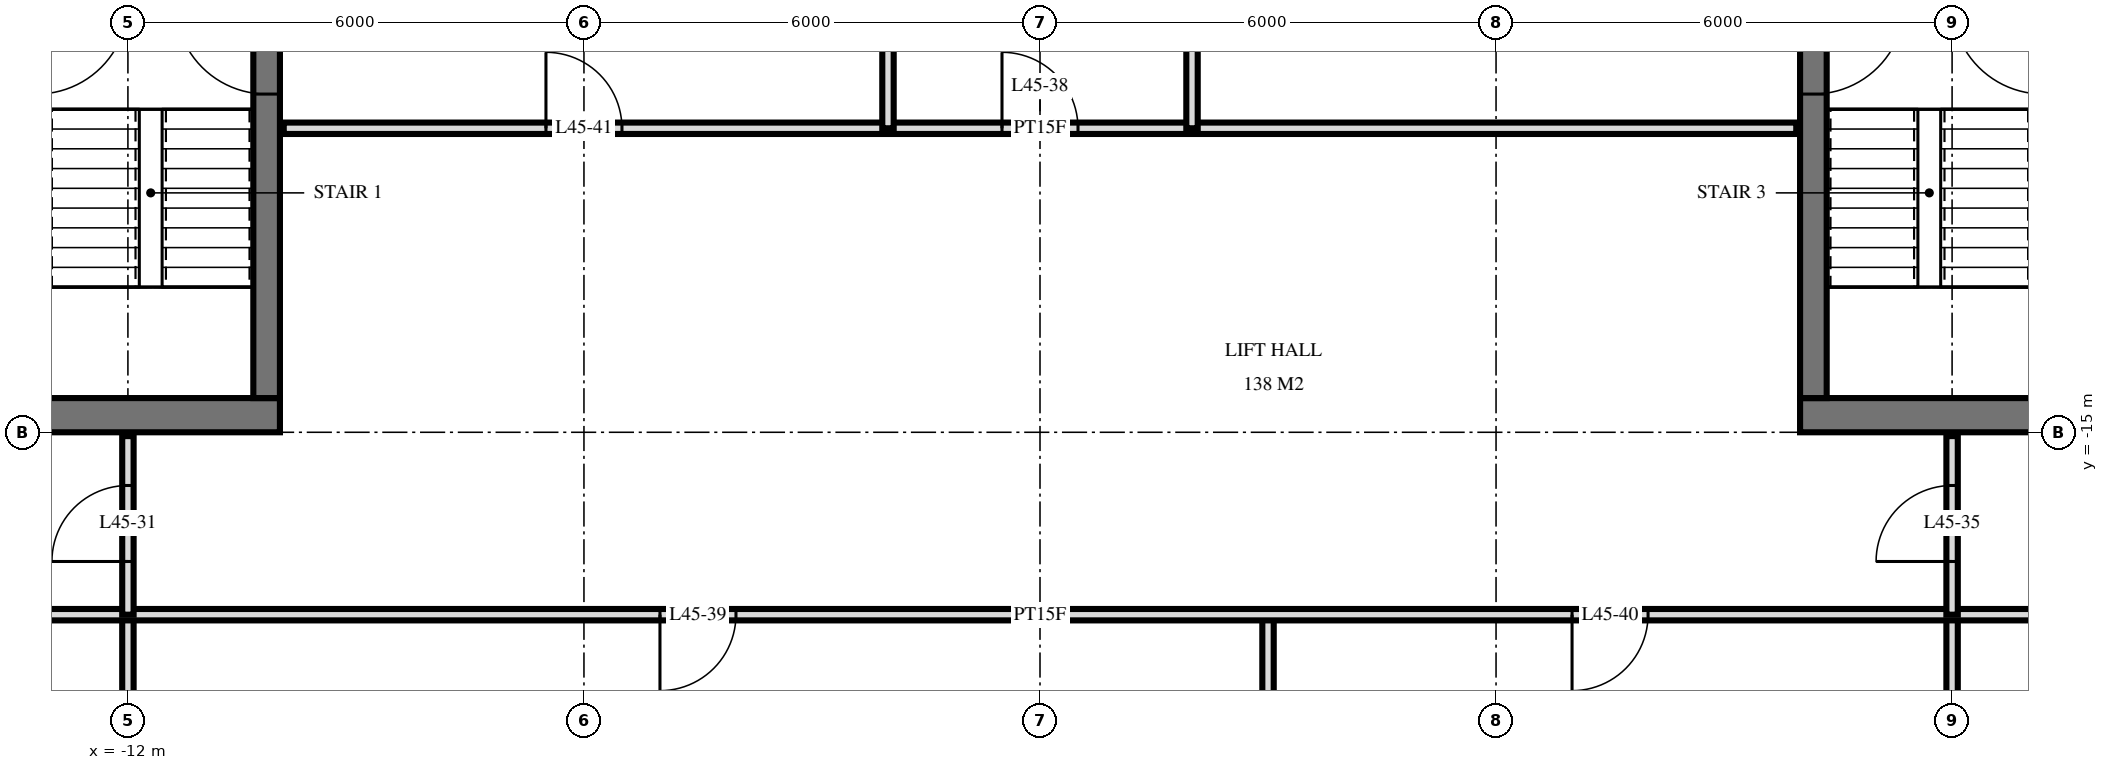
"""IFC4 building model, lengths in metres.
Left out: names, types, materials, properties, quantities, classifications, styles, units other than length and angle.
Written with IfcOpenShell. Run it as: python <this file> out.ifc"""

import sys

from ifc_helpers import new_model, si_unit, direction, frame, frame_2d, origin, place, context, subcontext, project, spatial, rectangle, extrude, element, fill, save


model = new_model("IFC4")
c1 = context("Model", 3, precision=1e-05, world=origin(), true_north=direction((0.0, 1.0)))
c2 = subcontext(c1, "Body", "Model", "MODEL_VIEW")
j1 = project(units=[si_unit("LENGTHUNIT", "METRE"), si_unit("PLANEANGLEUNIT", "RADIAN")], contexts=[c1])
p1 = place(None, origin())
s1 = spatial("IfcSite", under=j1, at=p1, CompositionType="ELEMENT")
p2 = place(p1, origin())
s2 = spatial("IfcBuilding", under=s1, at=p2, CompositionType="ELEMENT")
p3 = place(p2, frame((0.0, 0.0, 174.0)))
s3 = spatial("IfcBuildingStorey", under=s2, at=p3, CompositionType="ELEMENT", Elevation=174.0)
p4 = place(p3, frame((-24.5, -14.775, 0.0), z_axis=(0.0, 0.0, 1.0), x_axis=(1.0, 0.0, 0.0)))
e1 = element("IfcWall", 1, at=p4, inside=s3, PredefinedType="SHEAR", context=c2, shape_type="SweptSolid", body=[
    extrude(rectangle(XDim=14.5, YDim=0.45, at=frame_2d((7.25, 0.0))), origin(), (0.0, 0.0, 1.0), 3.6),
])
p5 = place(p4, frame((6.2, 0.0, 0.0)))
e2 = element("IfcOpeningElement", 2, at=p5, cuts=e1, PredefinedType="OPENING", context=c2, shape_type="SweptSolid", body=[
    extrude(rectangle(XDim=1.2, YDim=2.1, at=frame_2d((0.6, 1.05))), frame((0.0, 0.235, 0.0), z_axis=(0.0, -1.0, 0.0), x_axis=(1.0, 0.0, 0.0)), (0.0, 0.0, 1.0), 0.47),
])
p6 = place(p4, frame((9.25, 0.0, 0.0)))
e3 = element("IfcOpeningElement", 3, at=p6, cuts=e1, PredefinedType="OPENING", context=c2, shape_type="SweptSolid", body=[
    extrude(rectangle(XDim=1.1, YDim=2.1, at=frame_2d((0.55, 1.05))), frame((0.0, 0.235, 0.0), z_axis=(0.0, -1.0, 0.0), x_axis=(1.0, 0.0, 0.0)), (0.0, 0.0, 1.0), 0.47),
])
p7 = place(p4, frame((3.5, 0.0, 0.0)))
e4 = element("IfcOpeningElement", 4, at=p7, cuts=e1, PredefinedType="OPENING", context=c2, shape_type="SweptSolid", body=[
    extrude(rectangle(XDim=0.9, YDim=2.1, at=frame_2d((0.45, 1.05))), frame((0.0, 0.235, 0.0), z_axis=(0.0, -1.0, 0.0), x_axis=(1.0, 0.0, 0.0)), (0.0, 0.0, 1.0), 0.47),
])
p8 = place(p4, frame((1.05, 0.0, 0.0)))
e5 = element("IfcOpeningElement", 5, at=p8, cuts=e1, PredefinedType="OPENING", context=c2, shape_type="SweptSolid", body=[
    extrude(rectangle(XDim=1.0, YDim=2.1, at=frame_2d((0.5, 1.05))), frame((0.0, 0.235, 0.0), z_axis=(0.0, -1.0, 0.0), x_axis=(1.0, 0.0, 0.0)), (0.0, 0.0, 1.0), 0.47),
])
p9 = place(p3, frame((-10.175, -14.55, 0.0), z_axis=(0.0, 0.0, 1.0), x_axis=(0.0, 1.0, 0.0)))
e6 = element("IfcWall", 6, at=p9, inside=s3, PredefinedType="SHEAR", context=c2, shape_type="SweptSolid", body=[
    extrude(rectangle(XDim=14.1, YDim=0.35, at=frame_2d((7.05, 0.0))), origin(), (0.0, 0.0, 1.0), 3.6),
])
p10 = place(p9, frame((8.4, 0.0, 0.0)))
e7 = element("IfcOpeningElement", 7, at=p10, cuts=e6, PredefinedType="OPENING", context=c2, shape_type="SweptSolid", body=[
    extrude(rectangle(XDim=1.4, YDim=2.4, at=frame_2d((0.7, 1.2))), frame((0.0, 0.185, 0.0), z_axis=(0.0, -1.0, 0.0), x_axis=(1.0, 0.0, 0.0)), (0.0, 0.0, 1.0), 0.37),
])
p11 = place(p9, frame((10.0, 0.0, 0.0)))
e8 = element("IfcOpeningElement", 8, at=p11, cuts=e6, PredefinedType="OPENING", context=c2, shape_type="SweptSolid", body=[
    extrude(rectangle(XDim=1.4, YDim=2.4, at=frame_2d((0.7, 1.2))), frame((0.0, 0.185, 0.0), z_axis=(0.0, -1.0, 0.0), x_axis=(1.0, 0.0, 0.0)), (0.0, 0.0, 1.0), 0.37),
])
p12 = place(p9, frame((4.0, 0.0, 0.0)))
e9 = element("IfcOpeningElement", 9, at=p12, cuts=e6, PredefinedType="OPENING", context=c2, shape_type="SweptSolid", body=[
    extrude(rectangle(XDim=1.2, YDim=2.1, at=frame_2d((0.6, 1.05))), frame((0.0, 0.185, 0.0), z_axis=(0.0, -1.0, 0.0), x_axis=(1.0, 0.0, 0.0)), (0.0, 0.0, 1.0), 0.37),
])
p13 = place(p3, frame((10.0, -14.775, 0.0), z_axis=(0.0, 0.0, 1.0), x_axis=(1.0, 0.0, 0.0)))
e10 = element("IfcWall", 10, at=p13, inside=s3, PredefinedType="SHEAR", context=c2, shape_type="SweptSolid", body=[
    extrude(rectangle(XDim=14.5, YDim=0.45, at=frame_2d((7.25, 0.0))), origin(), (0.0, 0.0, 1.0), 3.6),
])
p14 = place(p13, frame((7.1, 0.0, 0.0)))
e11 = element("IfcOpeningElement", 11, at=p14, cuts=e10, PredefinedType="OPENING", context=c2, shape_type="SweptSolid", body=[
    extrude(rectangle(XDim=1.2, YDim=2.1, at=frame_2d((0.6, 1.05))), frame((0.0, 0.235, 0.0), z_axis=(0.0, -1.0, 0.0), x_axis=(1.0, 0.0, 0.0)), (0.0, 0.0, 1.0), 0.47),
])
p15 = place(p13, frame((4.15, 0.0, 0.0)))
e12 = element("IfcOpeningElement", 12, at=p15, cuts=e10, PredefinedType="OPENING", context=c2, shape_type="SweptSolid", body=[
    extrude(rectangle(XDim=1.1, YDim=2.1, at=frame_2d((0.55, 1.05))), frame((0.0, 0.235, 0.0), z_axis=(0.0, -1.0, 0.0), x_axis=(1.0, 0.0, 0.0)), (0.0, 0.0, 1.0), 0.47),
])
p16 = place(p13, frame((10.1, 0.0, 0.0)))
e13 = element("IfcOpeningElement", 13, at=p16, cuts=e10, PredefinedType="OPENING", context=c2, shape_type="SweptSolid", body=[
    extrude(rectangle(XDim=0.9, YDim=2.1, at=frame_2d((0.45, 1.05))), frame((0.0, 0.235, 0.0), z_axis=(0.0, -1.0, 0.0), x_axis=(1.0, 0.0, 0.0)), (0.0, 0.0, 1.0), 0.47),
])
p17 = place(p13, frame((12.45, 0.0, 0.0)))
e14 = element("IfcOpeningElement", 14, at=p17, cuts=e10, PredefinedType="OPENING", context=c2, shape_type="SweptSolid", body=[
    extrude(rectangle(XDim=1.0, YDim=2.1, at=frame_2d((0.5, 1.05))), frame((0.0, 0.235, 0.0), z_axis=(0.0, -1.0, 0.0), x_axis=(1.0, 0.0, 0.0)), (0.0, 0.0, 1.0), 0.47),
])
p18 = place(p3, frame((10.175, -14.55, 0.0), z_axis=(0.0, 0.0, 1.0), x_axis=(0.0, 1.0, 0.0)))
e15 = element("IfcWall", 15, at=p18, inside=s3, PredefinedType="SHEAR", context=c2, shape_type="SweptSolid", body=[
    extrude(rectangle(XDim=14.1, YDim=0.35, at=frame_2d((7.05, 0.0))), origin(), (0.0, 0.0, 1.0), 3.6),
])
p19 = place(p18, frame((8.4, 0.0, 0.0)))
e16 = element("IfcOpeningElement", 16, at=p19, cuts=e15, PredefinedType="OPENING", context=c2, shape_type="SweptSolid", body=[
    extrude(rectangle(XDim=1.4, YDim=2.4, at=frame_2d((0.7, 1.2))), frame((0.0, 0.185, 0.0), z_axis=(0.0, -1.0, 0.0), x_axis=(1.0, 0.0, 0.0)), (0.0, 0.0, 1.0), 0.37),
])
p20 = place(p18, frame((10.0, 0.0, 0.0)))
e17 = element("IfcOpeningElement", 17, at=p20, cuts=e15, PredefinedType="OPENING", context=c2, shape_type="SweptSolid", body=[
    extrude(rectangle(XDim=1.4, YDim=2.4, at=frame_2d((0.7, 1.2))), frame((0.0, 0.185, 0.0), z_axis=(0.0, -1.0, 0.0), x_axis=(1.0, 0.0, 0.0)), (0.0, 0.0, 1.0), 0.37),
])
p21 = place(p18, frame((4.0, 0.0, 0.0)))
e18 = element("IfcOpeningElement", 18, at=p21, cuts=e15, PredefinedType="OPENING", context=c2, shape_type="SweptSolid", body=[
    extrude(rectangle(XDim=1.2, YDim=2.1, at=frame_2d((0.6, 1.05))), frame((0.0, 0.185, 0.0), z_axis=(0.0, -1.0, 0.0), x_axis=(1.0, 0.0, 0.0)), (0.0, 0.0, 1.0), 0.37),
])
p22 = place(p3, frame((12.0, -17.4, 0.0), z_axis=(0.0, 0.0, 1.0), x_axis=(0.0, 1.0, 0.0)))
e19 = element("IfcWall", 19, at=p22, inside=s3, PredefinedType="PARTITIONING", context=c2, shape_type="SweptSolid", body=[
    extrude(rectangle(XDim=2.35, YDim=0.15, at=frame_2d((1.175, 0.0))), origin(), (0.0, 0.0, 1.0), 3.32),
])
p23 = place(p22, frame((0.7, 0.0, 0.0)))
e20 = element("IfcOpeningElement", 20, at=p23, cuts=e19, PredefinedType="OPENING", context=c2, shape_type="SweptSolid", body=[
    extrude(rectangle(XDim=1.0, YDim=2.1, at=frame_2d((0.5, 1.05))), frame((0.0, 0.085, 0.0), z_axis=(0.0, -1.0, 0.0), x_axis=(1.0, 0.0, 0.0)), (0.0, 0.0, 1.0), 0.17),
])
for number, where, z_axis, x_axis in (
    (21, (12.0, -33.62, 0.0), (0.0, 0.0, 1.0), (0.0, 1.0, 0.0)),
    (22, (3.0, -33.62, 0.0), (0.0, 0.0, 1.0), (0.0, 1.0, 0.0)),
):
    element("IfcWall", number, at=place(p3, frame(where, z_axis=z_axis, x_axis=x_axis)), inside=s3, PredefinedType="PARTITIONING", context=c2, shape_type="SweptSolid", body=[
        extrude(rectangle(XDim=16.22, YDim=0.15, at=frame_2d((8.11, 0.0))), origin(), (0.0, 0.0, 1.0), 3.32),
    ])
for number, where, z_axis, x_axis in (
    (23, (2.0, -11.0, 0.0), (0.0, 0.0, 1.0), (0.0, 1.0, 0.0)),
    (24, (-2.0, -11.0, 0.0), (0.0, 0.0, 1.0), (0.0, 1.0, 0.0)),
):
    element("IfcWall", number, at=place(p3, frame(where, z_axis=z_axis, x_axis=x_axis)), inside=s3, PredefinedType="PARTITIONING", context=c2, shape_type="SweptSolid", body=[
        extrude(rectangle(XDim=4.0, YDim=0.15, at=frame_2d((2.0, 0.0))), origin(), (0.0, 0.0, 1.0), 3.32),
    ])
p24 = place(p3, frame((-12.0, -17.4, 0.0), z_axis=(0.0, 0.0, 1.0), x_axis=(0.0, 1.0, 0.0)))
e25 = element("IfcWall", 25, at=p24, inside=s3, PredefinedType="PARTITIONING", context=c2, shape_type="SweptSolid", body=[
    extrude(rectangle(XDim=2.35, YDim=0.15, at=frame_2d((1.175, 0.0))), origin(), (0.0, 0.0, 1.0), 3.32),
])
p25 = place(p24, frame((0.7, 0.0, 0.0)))
e26 = element("IfcOpeningElement", 26, at=p25, cuts=e25, PredefinedType="OPENING", context=c2, shape_type="SweptSolid", body=[
    extrude(rectangle(XDim=1.0, YDim=2.1, at=frame_2d((0.5, 1.05))), frame((0.0, 0.085, 0.0), z_axis=(0.0, -1.0, 0.0), x_axis=(1.0, 0.0, 0.0)), (0.0, 0.0, 1.0), 0.17),
])
p26 = place(p3, frame((-12.0, -33.62, 0.0), z_axis=(0.0, 0.0, 1.0), x_axis=(0.0, 1.0, 0.0)))
e27 = element("IfcWall", 27, at=p26, inside=s3, PredefinedType="PARTITIONING", context=c2, shape_type="SweptSolid", body=[
    extrude(rectangle(XDim=16.22, YDim=0.15, at=frame_2d((8.11, 0.0))), origin(), (0.0, 0.0, 1.0), 3.32),
])
p27 = place(p3, frame((-28.02, -17.4, 0.0), z_axis=(0.0, 0.0, 1.0), x_axis=(1.0, 0.0, 0.0)))
e28 = element("IfcWall", 28, at=p27, inside=s3, PredefinedType="PARTITIONING", context=c2, shape_type="SweptSolid", body=[
    extrude(rectangle(XDim=56.04, YDim=0.15, at=frame_2d((28.02, 0.0))), origin(), (0.0, 0.0, 1.0), 3.32),
])
p28 = place(p27, frame((10.42, 0.0, 0.0)))
e29 = element("IfcOpeningElement", 29, at=p28, cuts=e28, PredefinedType="OPENING", context=c2, shape_type="SweptSolid", body=[
    extrude(rectangle(XDim=1.0, YDim=2.1, at=frame_2d((0.5, 1.05))), frame((0.0, 0.085, 0.0), z_axis=(0.0, -1.0, 0.0), x_axis=(1.0, 0.0, 0.0)), (0.0, 0.0, 1.0), 0.17),
])
p29 = place(p27, frame((2.32, 0.0, 0.0)))
e30 = element("IfcOpeningElement", 30, at=p29, cuts=e28, PredefinedType="OPENING", context=c2, shape_type="SweptSolid", body=[
    extrude(rectangle(XDim=1.0, YDim=2.1, at=frame_2d((0.5, 1.05))), frame((0.0, 0.085, 0.0), z_axis=(0.0, -1.0, 0.0), x_axis=(1.0, 0.0, 0.0)), (0.0, 0.0, 1.0), 0.17),
])
p30 = place(p27, frame((49.72, 0.0, 0.0)))
e31 = element("IfcOpeningElement", 31, at=p30, cuts=e28, PredefinedType="OPENING", context=c2, shape_type="SweptSolid", body=[
    extrude(rectangle(XDim=1.0, YDim=2.1, at=frame_2d((0.5, 1.05))), frame((0.0, 0.085, 0.0), z_axis=(0.0, -1.0, 0.0), x_axis=(1.0, 0.0, 0.0)), (0.0, 0.0, 1.0), 0.17),
])
p31 = place(p27, frame((23.02, 0.0, 0.0)))
e32 = element("IfcOpeningElement", 32, at=p31, cuts=e28, PredefinedType="OPENING", context=c2, shape_type="SweptSolid", body=[
    extrude(rectangle(XDim=1.0, YDim=2.1, at=frame_2d((0.5, 1.05))), frame((0.0, 0.085, 0.0), z_axis=(0.0, -1.0, 0.0), x_axis=(1.0, 0.0, 0.0)), (0.0, 0.0, 1.0), 0.17),
])
p32 = place(p27, frame((35.02, 0.0, 0.0)))
e33 = element("IfcOpeningElement", 33, at=p32, cuts=e28, PredefinedType="OPENING", context=c2, shape_type="SweptSolid", body=[
    extrude(rectangle(XDim=1.0, YDim=2.1, at=frame_2d((0.5, 1.05))), frame((0.0, 0.085, 0.0), z_axis=(0.0, -1.0, 0.0), x_axis=(1.0, 0.0, 0.0)), (0.0, 0.0, 1.0), 0.17),
])
p33 = place(p3, frame((-9.95, -11.0, 0.0), z_axis=(0.0, 0.0, 1.0), x_axis=(1.0, 0.0, 0.0)))
e34 = element("IfcWall", 34, at=p33, inside=s3, PredefinedType="PARTITIONING", context=c2, shape_type="SweptSolid", body=[
    extrude(rectangle(XDim=19.9, YDim=0.15, at=frame_2d((9.95, 0.0))), origin(), (0.0, 0.0, 1.0), 3.32),
])
p34 = place(p33, frame((9.45, 0.0, 0.0)))
e35 = element("IfcOpeningElement", 35, at=p34, cuts=e34, PredefinedType="OPENING", context=c2, shape_type="SweptSolid", body=[
    extrude(rectangle(XDim=1.0, YDim=2.1, at=frame_2d((0.5, 1.05))), frame((0.0, 0.085, 0.0), z_axis=(0.0, -1.0, 0.0), x_axis=(1.0, 0.0, 0.0)), (0.0, 0.0, 1.0), 0.17),
])
p35 = place(p33, frame((3.45, 0.0, 0.0)))
e36 = element("IfcOpeningElement", 36, at=p35, cuts=e34, PredefinedType="OPENING", context=c2, shape_type="SweptSolid", body=[
    extrude(rectangle(XDim=1.0, YDim=2.1, at=frame_2d((0.5, 1.05))), frame((0.0, 0.085, 0.0), z_axis=(0.0, -1.0, 0.0), x_axis=(1.0, 0.0, 0.0)), (0.0, 0.0, 1.0), 0.17),
])
p36 = place(p12, origin())
e37 = element("IfcDoor", 37, at=p36, inside=s3, OperationType="SINGLE_SWING_LEFT", PredefinedType="DOOR", context=c2, shape_type="SweptSolid", body=[
    extrude(rectangle(XDim=1.2, YDim=2.1, at=frame_2d((0.6, 1.05))), frame((0.0, 0.025, 0.0), z_axis=(0.0, -1.0, 0.0), x_axis=(1.0, 0.0, 0.0)), (0.0, 0.0, 1.0), 0.05),
])
fill(e9, e37)
p37 = place(p21, frame((0.6, 0.0, 0.0), z_axis=(0.0, 0.0, 1.0), x_axis=(-1.0, 0.0, 0.0)))
e38 = element("IfcDoor", 38, at=p37, inside=s3, OperationType="SINGLE_SWING_RIGHT", PredefinedType="DOOR", context=c2, shape_type="SweptSolid", body=[
    extrude(rectangle(XDim=1.2, YDim=2.1, at=frame_2d((0.0, 1.05))), frame((0.0, -0.025, 0.0), z_axis=(0.0, 1.0, 0.0), x_axis=(-1.0, 0.0, 0.0)), (0.0, 0.0, 1.0), 0.05),
])
fill(e18, e38)
p38 = place(p25, origin())
e39 = element("IfcDoor", 39, at=p38, inside=s3, OperationType="SINGLE_SWING_RIGHT", PredefinedType="DOOR", context=c2, shape_type="SweptSolid", body=[
    extrude(rectangle(XDim=1.0, YDim=2.1, at=frame_2d((0.5, 1.05))), frame((0.0, 0.025, 0.0), z_axis=(0.0, -1.0, 0.0), x_axis=(1.0, 0.0, 0.0)), (0.0, 0.0, 1.0), 0.05),
])
fill(e26, e39)
p39 = place(p23, origin())
e40 = element("IfcDoor", 40, at=p39, inside=s3, OperationType="SINGLE_SWING_RIGHT", PredefinedType="DOOR", context=c2, shape_type="SweptSolid", body=[
    extrude(rectangle(XDim=1.0, YDim=2.1, at=frame_2d((0.5, 1.05))), frame((0.0, 0.025, 0.0), z_axis=(0.0, -1.0, 0.0), x_axis=(1.0, 0.0, 0.0)), (0.0, 0.0, 1.0), 0.05),
])
fill(e20, e40)
p40 = place(p34, origin())
e41 = element("IfcDoor", 41, at=p40, inside=s3, OperationType="SINGLE_SWING_RIGHT", PredefinedType="DOOR", context=c2, shape_type="SweptSolid", body=[
    extrude(rectangle(XDim=1.0, YDim=2.1, at=frame_2d((0.5, 1.05))), frame((0.0, 0.025, 0.0), z_axis=(0.0, -1.0, 0.0), x_axis=(1.0, 0.0, 0.0)), (0.0, 0.0, 1.0), 0.05),
])
fill(e35, e41)
p41 = place(p31, frame((0.5, 0.0, 0.0), z_axis=(0.0, 0.0, 1.0), x_axis=(-1.0, 0.0, 0.0)))
e42 = element("IfcDoor", 42, at=p41, inside=s3, OperationType="SINGLE_SWING_LEFT", PredefinedType="DOOR", context=c2, shape_type="SweptSolid", body=[
    extrude(rectangle(XDim=1.0, YDim=2.1, at=frame_2d((0.0, 1.05))), frame((0.0, -0.025, 0.0), z_axis=(0.0, 1.0, 0.0), x_axis=(-1.0, 0.0, 0.0)), (0.0, 0.0, 1.0), 0.05),
])
fill(e32, e42)
p42 = place(p32, frame((0.5, 0.0, 0.0), z_axis=(0.0, 0.0, 1.0), x_axis=(-1.0, 0.0, 0.0)))
e43 = element("IfcDoor", 43, at=p42, inside=s3, OperationType="SINGLE_SWING_LEFT", PredefinedType="DOOR", context=c2, shape_type="SweptSolid", body=[
    extrude(rectangle(XDim=1.0, YDim=2.1, at=frame_2d((0.0, 1.05))), frame((0.0, -0.025, 0.0), z_axis=(0.0, 1.0, 0.0), x_axis=(-1.0, 0.0, 0.0)), (0.0, 0.0, 1.0), 0.05),
])
fill(e33, e43)
p43 = place(p35, origin())
e44 = element("IfcDoor", 44, at=p43, inside=s3, OperationType="SINGLE_SWING_RIGHT", PredefinedType="DOOR", context=c2, shape_type="SweptSolid", body=[
    extrude(rectangle(XDim=1.0, YDim=2.1, at=frame_2d((0.5, 1.05))), frame((0.0, 0.025, 0.0), z_axis=(0.0, -1.0, 0.0), x_axis=(1.0, 0.0, 0.0)), (0.0, 0.0, 1.0), 0.05),
])
fill(e36, e44)
save(model, sys.argv[1])
